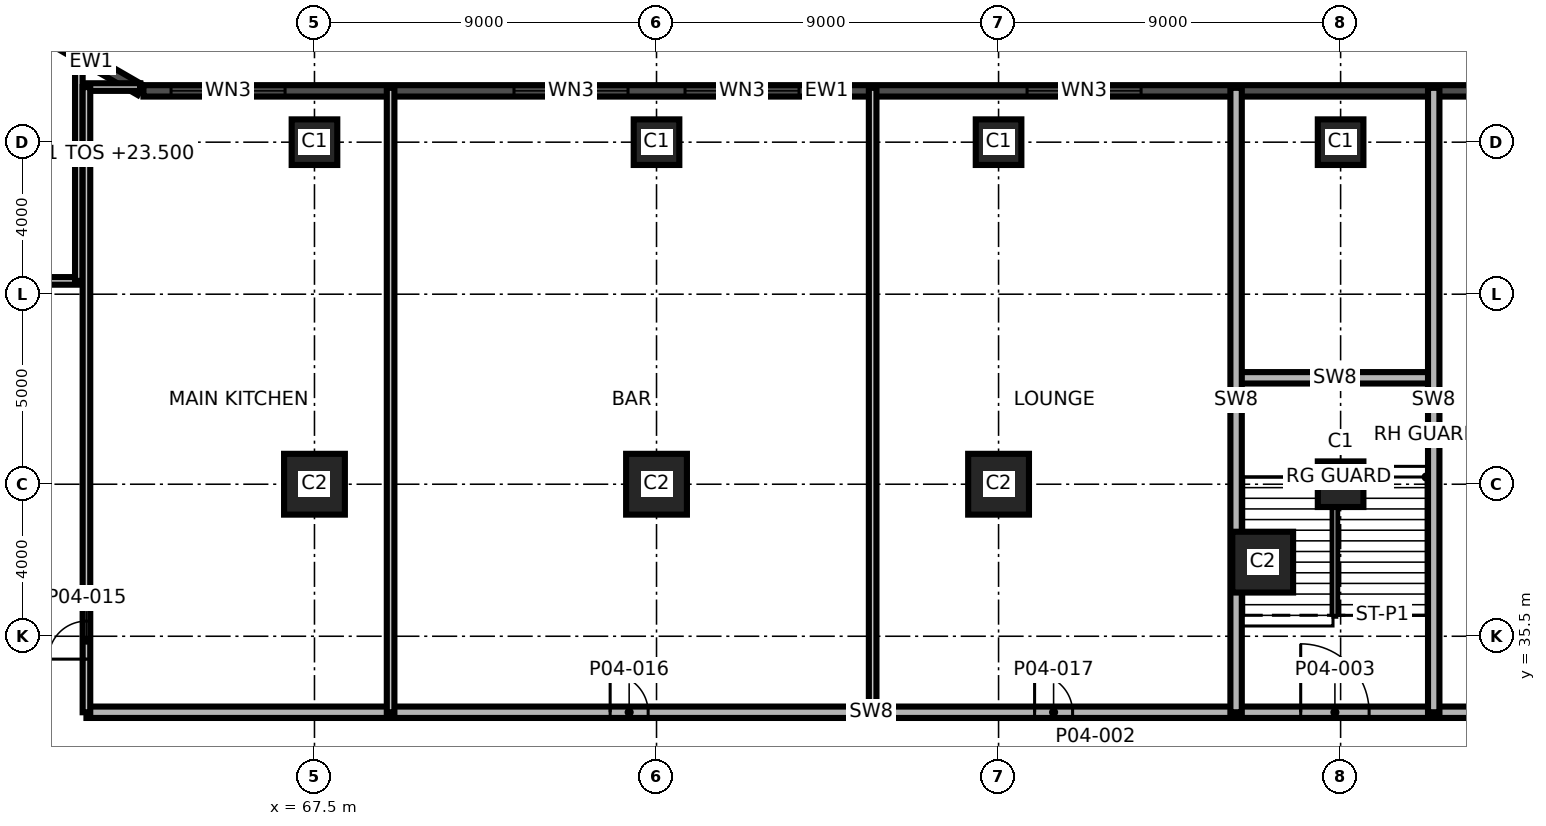
"""IFC4 building model, lengths in metres.
Left out: names, types, materials, properties, quantities, classifications, styles, units other than length and angle.
Written with IfcOpenShell. Run it as: python <this file> out.ifc"""

import sys

from ifc_helpers import new_model, si_unit, direction, frame, frame_2d, origin, origin_2d, place, context, subcontext, project, spatial, rectangle, extrude, element, fill, save


model = new_model("IFC4")
c1 = context("Model", 3, precision=1e-05, world=origin(), true_north=direction((0.0, 1.0)))
c2 = subcontext(c1, "Body", "Model", "MODEL_VIEW")
j1 = project(units=[si_unit("LENGTHUNIT", "METRE"), si_unit("PLANEANGLEUNIT", "RADIAN")], contexts=[c1])
p1 = place(None, origin())
s1 = spatial("IfcSite", under=j1, at=p1, CompositionType="ELEMENT")
p2 = place(p1, origin())
s2 = spatial("IfcBuilding", under=s1, at=p2, CompositionType="ELEMENT")
p3 = place(p2, frame((0.0, 0.0, 23.5)))
s3 = spatial("IfcBuildingStorey", under=s2, at=p3, CompositionType="ELEMENT", Elevation=23.5)
for number, where, z_axis, x_axis in (
    (1, (67.5, 39.5, 0.0), (0.0, 0.0, 1.0), (1.0, 0.0, 0.0)),
    (2, (76.5, 39.5, 0.0), (0.0, 0.0, 1.0), (1.0, 0.0, 0.0)),
    (3, (85.5, 39.5, 0.0), (0.0, 0.0, 1.0), (1.0, 0.0, 0.0)),
):
    element("IfcColumn", number, at=place(p3, frame(where, z_axis=z_axis, x_axis=x_axis)), inside=s3, PredefinedType="COLUMN", context=c2, shape_type="SweptSolid", body=[
        extrude(rectangle(XDim=1.6, YDim=1.6, at=origin_2d()), origin(), (0.0, 0.0, 1.0), 5.0),
    ])
for number, where, z_axis, x_axis in (
    (4, (94.5, 39.5, 0.0), (0.0, 0.0, 1.0), (1.0, 0.0, 0.0)),
    (5, (67.5, 48.5, 0.0), (0.0, 0.0, 1.0), (1.0, 0.0, 0.0)),
    (6, (76.5, 48.5, 0.0), (0.0, 0.0, 1.0), (1.0, 0.0, 0.0)),
    (7, (85.5, 48.5, 0.0), (0.0, 0.0, 1.0), (1.0, 0.0, 0.0)),
    (8, (94.5, 48.5, 0.0), (0.0, 0.0, 1.0), (1.0, 0.0, 0.0)),
):
    element("IfcColumn", number, at=place(p3, frame(where, z_axis=z_axis, x_axis=x_axis)), inside=s3, PredefinedType="COLUMN", context=c2, shape_type="SweptSolid", body=[
        extrude(rectangle(XDim=1.2, YDim=1.2, at=origin_2d()), origin(), (0.0, 0.0, 1.0), 5.0),
    ])
p4 = place(p3, frame((92.45, 37.45, 0.0), z_axis=(0.0, 0.0, 1.0), x_axis=(1.0, 0.0, 0.0)))
e9 = element("IfcColumn", 9, at=p4, inside=s3, PredefinedType="COLUMN", context=c2, shape_type="SweptSolid", body=[
    extrude(rectangle(XDim=1.6, YDim=1.6, at=origin_2d()), origin(), (0.0, 0.0, 1.0), 5.0),
])
p5 = place(p3, frame((98.952, 49.85, 0.0), z_axis=(0.0, 0.0, 1.0), x_axis=(-1.0, 0.0, 0.0)))
e10 = element("IfcWall", 10, at=p5, inside=s3, PredefinedType="SOLIDWALL", context=c2, shape_type="SweptSolid", body=[
    extrude(rectangle(XDim=35.952, YDim=0.3, at=frame_2d((17.976, 0.0))), origin(), (0.0, 0.0, 1.0), 4.7),
])
p6 = place(p5, frame((9.702, 0.0, 0.9)))
e11 = element("IfcOpeningElement", 11, at=p6, cuts=e10, PredefinedType="OPENING", context=c2, shape_type="SweptSolid", body=[
    extrude(rectangle(XDim=3.0, YDim=2.4, at=frame_2d((1.5, 1.2))), frame((0.0, 0.16, 0.0), z_axis=(0.0, -1.0, 0.0), x_axis=(1.0, 0.0, 0.0)), (0.0, 0.0, 1.0), 0.32),
])
p7 = place(p5, frame((18.702, 0.0, 0.9)))
e12 = element("IfcOpeningElement", 12, at=p7, cuts=e10, PredefinedType="OPENING", context=c2, shape_type="SweptSolid", body=[
    extrude(rectangle(XDim=3.0, YDim=2.4, at=frame_2d((1.5, 1.2))), frame((0.0, 0.16, 0.0), z_axis=(0.0, -1.0, 0.0), x_axis=(1.0, 0.0, 0.0)), (0.0, 0.0, 1.0), 0.32),
])
p8 = place(p5, frame((23.202, 0.0, 0.9)))
e13 = element("IfcOpeningElement", 13, at=p8, cuts=e10, PredefinedType="OPENING", context=c2, shape_type="SweptSolid", body=[
    extrude(rectangle(XDim=3.0, YDim=2.4, at=frame_2d((1.5, 1.2))), frame((0.0, 0.16, 0.0), z_axis=(0.0, -1.0, 0.0), x_axis=(1.0, 0.0, 0.0)), (0.0, 0.0, 1.0), 0.32),
])
p9 = place(p5, frame((32.226, 0.0, 0.9)))
e14 = element("IfcOpeningElement", 14, at=p9, cuts=e10, PredefinedType="OPENING", context=c2, shape_type="SweptSolid", body=[
    extrude(rectangle(XDim=3.0, YDim=2.4, at=frame_2d((1.5, 1.2))), frame((0.0, 0.16, 0.0), z_axis=(0.0, -1.0, 0.0), x_axis=(1.0, 0.0, 0.0)), (0.0, 0.0, 1.0), 0.32),
])
p10 = place(p3, frame((62.925, 49.87, 0.0), z_axis=(0.0, 0.0, 1.0), x_axis=(-0.866031096941, 0.499990139034, 0.0)))
e15 = element("IfcWall", 15, at=p10, inside=s3, PredefinedType="SOLIDWALL", context=c2, shape_type="SweptSolid", body=[
    extrude(rectangle(XDim=3.0, YDim=0.3, at=frame_2d((1.5, 0.0))), origin(), (0.0, 0.0, 1.0), 4.7),
])
p11 = place(p3, frame((61.5, 33.5, 0.0), z_axis=(0.0, 0.0, 1.0), x_axis=(1.0, 0.0, 0.0)))
e16 = element("IfcWall", 16, at=p11, inside=s3, PredefinedType="SHEAR", context=c2, shape_type="SweptSolid", body=[
    extrude(rectangle(XDim=41.3, YDim=0.3, at=frame_2d((20.65, 0.0))), origin(), (0.0, 0.0, 1.0), 4.7),
])
p12 = place(p11, frame((31.95, 0.0, 0.0)))
e17 = element("IfcOpeningElement", 17, at=p12, cuts=e16, PredefinedType="OPENING", context=c2, shape_type="SweptSolid", body=[
    extrude(rectangle(XDim=1.8, YDim=2.1, at=frame_2d((0.9, 1.05))), frame((0.0, 0.16, 0.0), z_axis=(0.0, -1.0, 0.0), x_axis=(1.0, 0.0, 0.0)), (0.0, 0.0, 1.0), 0.32),
])
p13 = place(p11, frame((13.78, 0.0, 0.0)))
e18 = element("IfcOpeningElement", 18, at=p13, cuts=e16, PredefinedType="OPENING", context=c2, shape_type="SweptSolid", body=[
    extrude(rectangle(XDim=1.0, YDim=2.1, at=frame_2d((0.5, 1.05))), frame((0.0, 0.16, 0.0), z_axis=(0.0, -1.0, 0.0), x_axis=(1.0, 0.0, 0.0)), (0.0, 0.0, 1.0), 0.32),
])
p14 = place(p11, frame((24.948, 0.0, 0.0)))
e19 = element("IfcOpeningElement", 19, at=p14, cuts=e16, PredefinedType="OPENING", context=c2, shape_type="SweptSolid", body=[
    extrude(rectangle(XDim=1.0, YDim=2.1, at=frame_2d((0.5, 1.05))), frame((0.0, 0.16, 0.0), z_axis=(0.0, -1.0, 0.0), x_axis=(1.0, 0.0, 0.0)), (0.0, 0.0, 1.0), 0.32),
])
p15 = place(p11, frame((37.853, 0.0, 0.0)))
e20 = element("IfcOpeningElement", 20, at=p15, cuts=e16, PredefinedType="OPENING", context=c2, shape_type="SweptSolid", body=[
    extrude(rectangle(XDim=1.0, YDim=2.1, at=frame_2d((0.5, 1.05))), frame((0.0, 0.16, 0.0), z_axis=(0.0, -1.0, 0.0), x_axis=(1.0, 0.0, 0.0)), (0.0, 0.0, 1.0), 0.32),
])
p16 = place(p3, frame((91.75, 42.3, 0.0), z_axis=(0.0, 0.0, 1.0), x_axis=(1.0, 0.0, 0.0)))
e21 = element("IfcWall", 21, at=p16, inside=s3, PredefinedType="SHEAR", context=c2, shape_type="SweptSolid", body=[
    extrude(rectangle(XDim=5.2, YDim=0.3, at=frame_2d((2.6, 0.0))), origin(), (0.0, 0.0, 1.0), 4.7),
])
p17 = place(p3, frame((43.3, 44.85, 0.0), z_axis=(0.0, 0.0, 1.0), x_axis=(1.0, 0.0, 0.0)))
e22 = element("IfcWall", 22, at=p17, inside=s3, PredefinedType="PARTITIONING", context=c2, shape_type="SweptSolid", body=[
    extrude(rectangle(XDim=18.2, YDim=0.2, at=frame_2d((9.1, 0.0))), origin(), (0.0, 0.0, 1.0), 4.7),
])
p18 = place(p17, frame((3.377, 0.0, 0.0)))
e23 = element("IfcOpeningElement", 23, at=p18, cuts=e22, PredefinedType="OPENING", context=c2, shape_type="SweptSolid", body=[
    extrude(rectangle(XDim=2.2, YDim=2.4, at=frame_2d((1.1, 1.2))), frame((0.0, 0.11, 0.0), z_axis=(0.0, -1.0, 0.0), x_axis=(1.0, 0.0, 0.0)), (0.0, 0.0, 1.0), 0.22),
])
p19 = place(p3, frame((61.5, 49.95, 0.0), z_axis=(0.0, 0.0, 1.0), x_axis=(1.0, 0.0, 0.0)))
e24 = element("IfcWall", 24, at=p19, inside=s3, PredefinedType="PARTITIONING", context=c2, shape_type="SweptSolid", body=[
    extrude(rectangle(XDim=1.416, YDim=0.2, at=frame_2d((0.708, 0.0))), origin(), (0.0, 0.0, 1.0), 4.7),
])
p20 = place(p3, frame((61.3, 44.85, 0.0), z_axis=(0.0, 0.0, 1.0), x_axis=(0.0, 1.0, 0.0)))
e25 = element("IfcWall", 25, at=p20, inside=s3, PredefinedType="PARTITIONING", context=c2, shape_type="SweptSolid", body=[
    extrude(rectangle(XDim=5.742, YDim=0.2, at=frame_2d((2.871, 0.0))), origin(), (0.0, 0.0, 1.0), 4.7),
])
p21 = place(p3, frame((61.5, 33.5, 0.0), z_axis=(0.0, 0.0, 1.0), x_axis=(0.0, 1.0, 0.0)))
e26 = element("IfcWall", 26, at=p21, inside=s3, PredefinedType="PARTITIONING", context=c2, shape_type="SweptSolid", body=[
    extrude(rectangle(XDim=16.45, YDim=0.2, at=frame_2d((8.225, 0.0))), origin(), (0.0, 0.0, 1.0), 4.7),
])
p22 = place(p21, frame((1.398, 0.0, 0.0)))
e27 = element("IfcOpeningElement", 27, at=p22, cuts=e26, PredefinedType="OPENING", context=c2, shape_type="SweptSolid", body=[
    extrude(rectangle(XDim=1.0, YDim=2.1, at=frame_2d((0.5, 1.05))), frame((0.0, 0.11, 0.0), z_axis=(0.0, -1.0, 0.0), x_axis=(1.0, 0.0, 0.0)), (0.0, 0.0, 1.0), 0.22),
])
for number, where, z_axis, x_axis in (
    (28, (69.503, 33.5, 0.0), (0.0, 0.0, 1.0), (0.0, 1.0, 0.0)),
    (29, (82.187, 33.5, 0.0), (0.0, 0.0, 1.0), (0.0, 1.0, 0.0)),
):
    element("IfcWall", number, at=place(p3, frame(where, z_axis=z_axis, x_axis=x_axis)), inside=s3, PredefinedType="PARTITIONING", context=c2, shape_type="SweptSolid", body=[
        extrude(rectangle(XDim=16.43, YDim=0.2, at=frame_2d((8.215, 0.0))), origin(), (0.0, 0.0, 1.0), 4.7),
    ])
for number, where, z_axis, x_axis in (
    (30, (91.75, 33.5, 0.0), (0.0, 0.0, 1.0), (0.0, 1.0, 0.0)),
    (31, (96.95, 33.5, 0.0), (0.0, 0.0, 1.0), (0.0, 1.0, 0.0)),
):
    element("IfcWall", number, at=place(p3, frame(where, z_axis=z_axis, x_axis=x_axis)), inside=s3, PredefinedType="SHEAR", context=c2, shape_type="SweptSolid", body=[
        extrude(rectangle(XDim=16.43, YDim=0.3, at=frame_2d((8.215, 0.0))), origin(), (0.0, 0.0, 1.0), 4.7),
    ])
p23 = place(p6, origin())
e32 = element("IfcWindow", 32, at=p23, inside=s3, PartitioningType="SINGLE_PANEL", PredefinedType="WINDOW", context=c2, shape_type="SweptSolid", body=[
    extrude(rectangle(XDim=3.0, YDim=2.4, at=frame_2d((1.5, 1.2))), frame((0.0, 0.03, 0.0), z_axis=(0.0, -1.0, 0.0), x_axis=(1.0, 0.0, 0.0)), (0.0, 0.0, 1.0), 0.06),
])
fill(e11, e32)
p24 = place(p7, origin())
e33 = element("IfcWindow", 33, at=p24, inside=s3, PartitioningType="SINGLE_PANEL", PredefinedType="WINDOW", context=c2, shape_type="SweptSolid", body=[
    extrude(rectangle(XDim=3.0, YDim=2.4, at=frame_2d((1.5, 1.2))), frame((0.0, 0.03, 0.0), z_axis=(0.0, -1.0, 0.0), x_axis=(1.0, 0.0, 0.0)), (0.0, 0.0, 1.0), 0.06),
])
fill(e12, e33)
p25 = place(p8, origin())
e34 = element("IfcWindow", 34, at=p25, inside=s3, PartitioningType="SINGLE_PANEL", PredefinedType="WINDOW", context=c2, shape_type="SweptSolid", body=[
    extrude(rectangle(XDim=3.0, YDim=2.4, at=frame_2d((1.5, 1.2))), frame((0.0, 0.03, 0.0), z_axis=(0.0, -1.0, 0.0), x_axis=(1.0, 0.0, 0.0)), (0.0, 0.0, 1.0), 0.06),
])
fill(e13, e34)
p26 = place(p9, origin())
e35 = element("IfcWindow", 35, at=p26, inside=s3, PartitioningType="SINGLE_PANEL", PredefinedType="WINDOW", context=c2, shape_type="SweptSolid", body=[
    extrude(rectangle(XDim=3.0, YDim=2.4, at=frame_2d((1.5, 1.2))), frame((0.0, 0.03, 0.0), z_axis=(0.0, -1.0, 0.0), x_axis=(1.0, 0.0, 0.0)), (0.0, 0.0, 1.0), 0.06),
])
fill(e14, e35)
p27 = place(p12, origin())
e36 = element("IfcDoor", 36, at=p27, inside=s3, OperationType="SINGLE_SWING_LEFT", PredefinedType="DOOR", context=c2, shape_type="SweptSolid", body=[
    extrude(rectangle(XDim=1.8, YDim=2.1, at=frame_2d((0.9, 1.05))), frame((0.0, 0.025, 0.0), z_axis=(0.0, -1.0, 0.0), x_axis=(1.0, 0.0, 0.0)), (0.0, 0.0, 1.0), 0.05),
])
fill(e17, e36)
p28 = place(p22, origin())
e37 = element("IfcDoor", 37, at=p28, inside=s3, OperationType="SINGLE_SWING_LEFT", PredefinedType="DOOR", context=c2, shape_type="SweptSolid", body=[
    extrude(rectangle(XDim=1.0, YDim=2.1, at=frame_2d((0.5, 1.05))), frame((0.0, 0.025, 0.0), z_axis=(0.0, -1.0, 0.0), x_axis=(1.0, 0.0, 0.0)), (0.0, 0.0, 1.0), 0.05),
])
fill(e27, e37)
p29 = place(p13, origin())
e38 = element("IfcDoor", 38, at=p29, inside=s3, OperationType="SINGLE_SWING_RIGHT", PredefinedType="DOOR", context=c2, shape_type="SweptSolid", body=[
    extrude(rectangle(XDim=1.0, YDim=2.1, at=frame_2d((0.5, 1.05))), frame((0.0, 0.025, 0.0), z_axis=(0.0, -1.0, 0.0), x_axis=(1.0, 0.0, 0.0)), (0.0, 0.0, 1.0), 0.05),
])
fill(e18, e38)
p30 = place(p14, origin())
e39 = element("IfcDoor", 39, at=p30, inside=s3, OperationType="SINGLE_SWING_LEFT", PredefinedType="DOOR", context=c2, shape_type="SweptSolid", body=[
    extrude(rectangle(XDim=1.0, YDim=2.1, at=frame_2d((0.5, 1.05))), frame((0.0, 0.025, 0.0), z_axis=(0.0, -1.0, 0.0), x_axis=(1.0, 0.0, 0.0)), (0.0, 0.0, 1.0), 0.05),
])
fill(e19, e39)
save(model, sys.argv[1])
